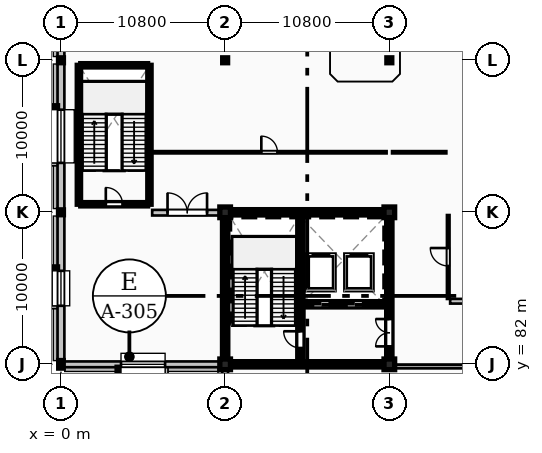
"""IFC4 building model, lengths in metres.
Left out: names, types, materials, properties, quantities, classifications, styles, units other than length and angle.
Written with IfcOpenShell. Run it as: python <this file> out.ifc"""

import sys

from ifc_helpers import new_model, si_unit, direction, frame, frame_2d, origin, origin_2d, place, context, subcontext, project, spatial, rectangle, hollow_circle, i_section, extrude, element, fill, save


model = new_model("IFC4")
c1 = context("Model", 3, precision=1e-05, world=origin(), true_north=direction((0.0, 1.0)))
c2 = subcontext(c1, "Body", "Model", "MODEL_VIEW")
j1 = project(units=[si_unit("LENGTHUNIT", "METRE"), si_unit("PLANEANGLEUNIT", "RADIAN")], contexts=[c1])
p1 = place(None, origin())
s1 = spatial("IfcSite", under=j1, at=p1, CompositionType="ELEMENT")
p2 = place(p1, origin())
s2 = spatial("IfcBuilding", under=s1, at=p2, CompositionType="ELEMENT")
p3 = place(p2, frame((0.0, 0.0, 4.8)))
s3 = spatial("IfcBuildingStorey", under=s2, at=p3, CompositionType="ELEMENT", Elevation=4.8)
p4 = place(p3, frame((0.0, 82.0, 0.0), z_axis=(0.0, 0.0, 1.0), x_axis=(1.0, 0.0, 0.0)))
e1 = element("IfcColumn", 1, at=p4, inside=s3, PredefinedType="COLUMN", context=c2, shape_type="SweptSolid", body=[
    extrude(i_section(OverallWidth=0.3, OverallDepth=0.5, WebThickness=0.014, FlangeThickness=0.028, FilletRadius=0.027, at=origin_2d()), origin(), (0.0, 0.0, 1.0), 4.8),
])
for number, where, z_axis, x_axis in (
    (2, (0.0, 92.0, 0.0), (0.0, 0.0, 1.0), (1.0, 0.0, 0.0)),
    (3, (0.0, 102.0, 0.0), (0.0, 0.0, 1.0), (1.0, 0.0, 0.0)),
):
    element("IfcColumn", number, at=place(p3, frame(where, z_axis=z_axis, x_axis=x_axis)), inside=s3, PredefinedType="COLUMN", context=c2, shape_type="SweptSolid", body=[
        extrude(hollow_circle(Radius=0.162, WallThickness=0.014, at=origin_2d()), origin(), (0.0, 0.0, 1.0), 4.8),
    ])
for number, where, z_axis, x_axis in (
    (4, (10.8, 82.0, 0.0), (0.0, 0.0, 1.0), (1.0, 0.0, 0.0)),
    (5, (10.8, 92.0, 0.0), (0.0, 0.0, 1.0), (1.0, 0.0, 0.0)),
):
    element("IfcColumn", number, at=place(p3, frame(where, z_axis=z_axis, x_axis=x_axis)), inside=s3, PredefinedType="COLUMN", context=c2, shape_type="SweptSolid", body=[
        extrude(rectangle(XDim=0.7, YDim=0.7, at=origin_2d()), origin(), (0.0, 0.0, 1.0), 4.8),
    ])
p5 = place(p3, frame((10.8, 102.0, 0.0), z_axis=(0.0, 0.0, 1.0), x_axis=(1.0, 0.0, 0.0)))
e6 = element("IfcColumn", 6, at=p5, inside=s3, PredefinedType="COLUMN", context=c2, shape_type="SweptSolid", body=[
    extrude(hollow_circle(Radius=0.162, WallThickness=0.014, at=origin_2d()), origin(), (0.0, 0.0, 1.0), 4.8),
])
for number, where, z_axis, x_axis in (
    (7, (21.6, 82.0, 0.0), (0.0, 0.0, 1.0), (1.0, 0.0, 0.0)),
    (8, (21.6, 92.0, 0.0), (0.0, 0.0, 1.0), (1.0, 0.0, 0.0)),
):
    element("IfcColumn", number, at=place(p3, frame(where, z_axis=z_axis, x_axis=x_axis)), inside=s3, PredefinedType="COLUMN", context=c2, shape_type="SweptSolid", body=[
        extrude(rectangle(XDim=0.7, YDim=0.7, at=origin_2d()), origin(), (0.0, 0.0, 1.0), 4.8),
    ])
p6 = place(p3, frame((21.6, 102.0, 0.0), z_axis=(0.0, 0.0, 1.0), x_axis=(1.0, 0.0, 0.0)))
e9 = element("IfcColumn", 9, at=p6, inside=s3, PredefinedType="COLUMN", context=c2, shape_type="SweptSolid", body=[
    extrude(hollow_circle(Radius=0.162, WallThickness=0.014, at=origin_2d()), origin(), (0.0, 0.0, 1.0), 4.8),
])
p7 = place(p3, frame((0.0, 111.855, 0.0), z_axis=(0.0, 0.0, 1.0), x_axis=(0.0, -1.0, 0.0)))
e10 = element("IfcWall", 10, at=p7, inside=s3, PredefinedType="STANDARD", context=c2, shape_type="SweptSolid", body=[
    extrude(rectangle(XDim=9.71, YDim=0.45, at=frame_2d((4.855, 0.0))), origin(), (0.0, 0.0, 1.0), 4.56),
])
p8 = place(p7, frame((4.08, 0.0, 1.0)))
e11 = element("IfcOpeningElement", 11, at=p8, cuts=e10, PredefinedType="OPENING", context=c2, shape_type="SweptSolid", body=[
    extrude(rectangle(XDim=1.55, YDim=2.5, at=frame_2d((0.775, 1.25))), frame((0.0, 0.235, 0.0), z_axis=(0.0, -1.0, 0.0), x_axis=(1.0, 0.0, 0.0)), (0.0, 0.0, 1.0), 0.47),
])
p9 = place(p3, frame((0.0, 101.855, 0.0), z_axis=(0.0, 0.0, 1.0), x_axis=(0.0, -1.0, 0.0)))
e12 = element("IfcWall", 12, at=p9, inside=s3, PredefinedType="STANDARD", context=c2, shape_type="SweptSolid", body=[
    extrude(rectangle(XDim=9.71, YDim=0.45, at=frame_2d((4.855, 0.0))), origin(), (0.0, 0.0, 1.0), 4.56),
])
p10 = place(p9, frame((3.105, 0.0, 1.0)))
e13 = element("IfcOpeningElement", 13, at=p10, cuts=e12, PredefinedType="OPENING", context=c2, shape_type="SweptSolid", body=[
    extrude(rectangle(XDim=3.5, YDim=2.3, at=frame_2d((1.75, 1.15))), frame((0.0, 0.235, 0.0), z_axis=(0.0, -1.0, 0.0), x_axis=(1.0, 0.0, 0.0)), (0.0, 0.0, 1.0), 0.47),
])
p11 = place(p3, frame((0.0, 91.855, 0.0), z_axis=(0.0, 0.0, 1.0), x_axis=(0.0, -1.0, 0.0)))
e14 = element("IfcWall", 14, at=p11, inside=s3, PredefinedType="STANDARD", context=c2, shape_type="SweptSolid", body=[
    extrude(rectangle(XDim=9.71, YDim=0.45, at=frame_2d((4.855, 0.0))), origin(), (0.0, 0.0, 1.0), 4.56),
])
p12 = place(p11, frame((3.705, 0.0, 1.0)))
e15 = element("IfcOpeningElement", 15, at=p12, cuts=e14, PredefinedType="OPENING", context=c2, shape_type="SweptSolid", body=[
    extrude(rectangle(XDim=2.3, YDim=2.3, at=frame_2d((1.15, 1.15))), frame((0.0, 0.235, 0.0), z_axis=(0.0, -1.0, 0.0), x_axis=(1.0, 0.0, 0.0)), (0.0, 0.0, 1.0), 0.47),
])
p13 = place(p3, frame((0.145, 82.0, 0.0), z_axis=(0.0, 0.0, 1.0), x_axis=(1.0, 0.0, 0.0)))
e16 = element("IfcWall", 16, at=p13, inside=s3, PredefinedType="STANDARD", context=c2, shape_type="SweptSolid", body=[
    extrude(rectangle(XDim=10.51, YDim=0.38, at=frame_2d((5.255, 0.0))), origin(), (0.0, 0.0, 1.0), 3.939),
])
p14 = place(p13, frame((3.805, 0.0, 1.0)))
e17 = element("IfcOpeningElement", 17, at=p14, cuts=e16, PredefinedType="OPENING", context=c2, shape_type="SweptSolid", body=[
    extrude(rectangle(XDim=2.9, YDim=2.5, at=frame_2d((1.45, 1.25))), frame((0.0, 0.2, 0.0), z_axis=(0.0, -1.0, 0.0), x_axis=(1.0, 0.0, 0.0)), (0.0, 0.0, 1.0), 0.4),
])
p15 = place(p3, frame((10.8, 81.855, 0.0), z_axis=(0.0, 0.0, 1.0), x_axis=(0.0, -1.0, 0.0)))
e18 = element("IfcWall", 18, at=p15, inside=s3, PredefinedType="STANDARD", context=c2, shape_type="SweptSolid", body=[
    extrude(rectangle(XDim=9.71, YDim=0.38, at=frame_2d((4.855, 0.0))), origin(), (0.0, 0.0, 1.0), 4.04),
])
p16 = place(p15, frame((3.105, 0.0, 1.0)))
e19 = element("IfcOpeningElement", 19, at=p16, cuts=e18, PredefinedType="OPENING", context=c2, shape_type="SweptSolid", body=[
    extrude(rectangle(XDim=3.5, YDim=2.3, at=frame_2d((1.75, 1.15))), frame((0.0, 0.2, 0.0), z_axis=(0.0, -1.0, 0.0), x_axis=(1.0, 0.0, 0.0)), (0.0, 0.0, 1.0), 0.4),
])
for number, where, z_axis, x_axis in (
    (20, (11.15, 82.0, 0.0), (0.0, 0.0, 1.0), (1.0, 0.0, 0.0)),
    (21, (11.15, 92.0, 0.0), (0.0, 0.0, 1.0), (1.0, 0.0, 0.0)),
):
    element("IfcWall", number, at=place(p3, frame(where, z_axis=z_axis, x_axis=x_axis)), inside=s3, PredefinedType="SHEAR", context=c2, shape_type="SweptSolid", body=[
        extrude(rectangle(XDim=10.1, YDim=0.35, at=frame_2d((5.05, 0.0))), origin(), (0.0, 0.0, 1.0), 4.56),
    ])
p17 = place(p3, frame((10.8, 82.35, 0.0), z_axis=(0.0, 0.0, 1.0), x_axis=(0.0, 1.0, 0.0)))
e22 = element("IfcWall", 22, at=p17, inside=s3, PredefinedType="SHEAR", context=c2, shape_type="SweptSolid", body=[
    extrude(rectangle(XDim=9.3, YDim=0.35, at=frame_2d((4.65, 0.0))), origin(), (0.0, 0.0, 1.0), 4.56),
])
p18 = place(p3, frame((21.6, 82.35, 0.0), z_axis=(0.0, 0.0, 1.0), x_axis=(0.0, 1.0, 0.0)))
e23 = element("IfcWall", 23, at=p18, inside=s3, PredefinedType="SHEAR", context=c2, shape_type="SweptSolid", body=[
    extrude(rectangle(XDim=9.3, YDim=0.35, at=frame_2d((4.65, 0.0))), origin(), (0.0, 0.0, 1.0), 4.56),
])
p19 = place(p18, frame((0.83, 0.0, 0.0)))
e24 = element("IfcOpeningElement", 24, at=p19, cuts=e23, PredefinedType="OPENING", context=c2, shape_type="SweptSolid", body=[
    extrude(rectangle(XDim=1.8, YDim=2.25, at=frame_2d((0.9, 1.125))), frame((0.0, 0.185, 0.0), z_axis=(0.0, -1.0, 0.0), x_axis=(1.0, 0.0, 0.0)), (0.0, 0.0, 1.0), 0.37),
])
p20 = place(p3, frame((15.75, 82.175, 0.0), z_axis=(0.0, 0.0, 1.0), x_axis=(0.0, 1.0, 0.0)))
e25 = element("IfcWall", 25, at=p20, inside=s3, PredefinedType="SHEAR", context=c2, shape_type="SweptSolid", body=[
    extrude(rectangle(XDim=9.65, YDim=0.35, at=frame_2d((4.825, 0.0))), origin(), (0.0, 0.0, 1.0), 4.56),
])
p21 = place(p20, frame((0.9, 0.0, 0.0)))
e26 = element("IfcOpeningElement", 26, at=p21, cuts=e25, PredefinedType="OPENING", context=c2, shape_type="SweptSolid", body=[
    extrude(rectangle(XDim=1.1, YDim=2.2, at=frame_2d((0.55, 1.1))), frame((0.0, 0.185, 0.0), z_axis=(0.0, -1.0, 0.0), x_axis=(1.0, 0.0, 0.0)), (0.0, 0.0, 1.0), 0.37),
])
p22 = place(p3, frame((15.93, 85.95, 0.0), z_axis=(0.0, 0.0, 1.0), x_axis=(1.0, 0.0, 0.0)))
e27 = element("IfcWall", 27, at=p22, inside=s3, PredefinedType="SHEAR", context=c2, shape_type="SweptSolid", body=[
    extrude(rectangle(XDim=5.49, YDim=0.35, at=frame_2d((2.745, 0.0))), origin(), (0.0, 0.0, 1.0), 4.56),
])
p23 = place(p22, frame((0.65, 0.0, 0.0)))
e28 = element("IfcOpeningElement", 28, at=p23, cuts=e27, PredefinedType="OPENING", context=c2, shape_type="SweptSolid", body=[
    extrude(rectangle(XDim=1.1, YDim=2.2, at=frame_2d((0.55, 1.1))), frame((0.0, 0.185, 0.0), z_axis=(0.0, -1.0, 0.0), x_axis=(1.0, 0.0, 0.0)), (0.0, 0.0, 1.0), 0.37),
])
p24 = place(p22, frame((2.85, 0.0, 0.0)))
e29 = element("IfcOpeningElement", 29, at=p24, cuts=e27, PredefinedType="OPENING", context=c2, shape_type="SweptSolid", body=[
    extrude(rectangle(XDim=1.1, YDim=2.2, at=frame_2d((0.55, 1.1))), frame((0.0, 0.185, 0.0), z_axis=(0.0, -1.0, 0.0), x_axis=(1.0, 0.0, 0.0)), (0.0, 0.0, 1.0), 0.37),
])
for number, where, z_axis, x_axis in (
    (30, (1.18, 92.53, 0.0), (0.0, 0.0, 1.0), (0.0, 1.0, 0.0)),
    (31, (5.82, 92.53, 0.0), (0.0, 0.0, 1.0), (0.0, 1.0, 0.0)),
):
    element("IfcWall", number, at=place(p3, frame(where, z_axis=z_axis, x_axis=x_axis)), inside=s3, PredefinedType="SHEAR", context=c2, shape_type="SweptSolid", body=[
        extrude(rectangle(XDim=9.14, YDim=0.22, at=frame_2d((4.57, 0.0))), origin(), (0.0, 0.0, 1.0), 4.56),
    ])
p25 = place(p3, frame((1.3, 101.67, 0.0), z_axis=(0.0, 0.0, 1.0), x_axis=(1.0, 0.0, 0.0)))
e32 = element("IfcWall", 32, at=p25, inside=s3, PredefinedType="SHEAR", context=c2, shape_type="SweptSolid", body=[
    extrude(rectangle(XDim=4.4, YDim=0.22, at=frame_2d((2.2, 0.0))), origin(), (0.0, 0.0, 1.0), 4.56),
])
p26 = place(p3, frame((1.3, 92.53, 0.0), z_axis=(0.0, 0.0, 1.0), x_axis=(1.0, 0.0, 0.0)))
e33 = element("IfcWall", 33, at=p26, inside=s3, PredefinedType="SHEAR", context=c2, shape_type="SweptSolid", body=[
    extrude(rectangle(XDim=4.4, YDim=0.22, at=frame_2d((2.2, 0.0))), origin(), (0.0, 0.0, 1.0), 4.56),
])
p27 = place(p26, frame((1.65, 0.0, 0.0)))
e34 = element("IfcOpeningElement", 34, at=p27, cuts=e33, PredefinedType="OPENING", context=c2, shape_type="SweptSolid", body=[
    extrude(rectangle(XDim=1.1, YDim=2.2, at=frame_2d((0.55, 1.1))), frame((0.0, 0.12, 0.0), z_axis=(0.0, -1.0, 0.0), x_axis=(1.0, 0.0, 0.0)), (0.0, 0.0, 1.0), 0.24),
])
p28 = place(p3, frame((21.78, 81.85, 0.0), z_axis=(0.0, 0.0, 1.0), x_axis=(1.0, 0.0, 0.0)))
e35 = element("IfcWall", 35, at=p28, inside=s3, PredefinedType="PARTITIONING", context=c2, shape_type="SweptSolid", body=[
    extrude(rectangle(XDim=10.42, YDim=0.23, at=frame_2d((5.21, 0.0))), origin(), (0.0, 0.0, 1.0), 3.939),
])
p29 = place(p3, frame((25.6, 86.15, 0.0), z_axis=(0.0, 0.0, 1.0), x_axis=(1.0, 0.0, 0.0)))
e36 = element("IfcWall", 36, at=p29, inside=s3, PredefinedType="PARTITIONING", context=c2, shape_type="SweptSolid", body=[
    extrude(rectangle(XDim=28.22, YDim=0.31, at=frame_2d((14.11, 0.0))), origin(), (0.0, 0.0, 1.0), 4.52),
])
p30 = place(p29, frame((12.96, 0.0, 0.0)))
e37 = element("IfcOpeningElement", 37, at=p30, cuts=e36, PredefinedType="OPENING", context=c2, shape_type="SweptSolid", body=[
    extrude(rectangle(XDim=2.3, YDim=2.65, at=frame_2d((1.15, 1.325))), frame((0.0, 0.165, 0.0), z_axis=(0.0, -1.0, 0.0), x_axis=(1.0, 0.0, 0.0)), (0.0, 0.0, 1.0), 0.33),
])
p31 = place(p3, frame((6.0, 91.975, 0.0), z_axis=(0.0, 0.0, 1.0), x_axis=(1.0, 0.0, 0.0)))
e38 = element("IfcWall", 38, at=p31, inside=s3, PredefinedType="PARTITIONING", context=c2, shape_type="SweptSolid", body=[
    extrude(rectangle(XDim=4.62, YDim=0.37, at=frame_2d((2.31, 0.0))), origin(), (0.0, 0.0, 1.0), 4.069),
])
p32 = place(p31, frame((1.01, 0.0, 0.0)))
e39 = element("IfcOpeningElement", 39, at=p32, cuts=e38, PredefinedType="OPENING", context=c2, shape_type="SweptSolid", body=[
    extrude(rectangle(XDim=2.6, YDim=2.8, at=frame_2d((1.3, 1.4))), frame((0.0, 0.195, 0.0), z_axis=(0.0, -1.0, 0.0), x_axis=(1.0, 0.0, 0.0)), (0.0, 0.0, 1.0), 0.39),
])
p33 = place(p3, frame((6.0, 95.95, 0.0), z_axis=(0.0, 0.0, 1.0), x_axis=(1.0, 0.0, 0.0)))
e40 = element("IfcWall", 40, at=p33, inside=s3, PredefinedType="PARTITIONING", context=c2, shape_type="SweptSolid", body=[
    extrude(rectangle(XDim=15.42, YDim=0.15, at=frame_2d((7.71, 0.0))), origin(), (0.0, 0.0, 1.0), 4.52),
])
p34 = place(p33, frame((7.18, 0.0, 0.0)))
e41 = element("IfcOpeningElement", 41, at=p34, cuts=e40, PredefinedType="OPENING", context=c2, shape_type="SweptSolid", body=[
    extrude(rectangle(XDim=1.06, YDim=2.22, at=frame_2d((0.53, 1.11))), frame((0.0, 0.085, 0.0), z_axis=(0.0, -1.0, 0.0), x_axis=(1.0, 0.0, 0.0)), (0.0, 0.0, 1.0), 0.17),
])
p35 = place(p3, frame((25.475, 86.3, 0.0), z_axis=(0.0, 0.0, 1.0), x_axis=(0.0, 1.0, 0.0)))
e42 = element("IfcWall", 42, at=p35, inside=s3, PredefinedType="PARTITIONING", context=c2, shape_type="SweptSolid", body=[
    extrude(rectangle(XDim=5.52, YDim=0.17, at=frame_2d((2.76, 0.0))), origin(), (0.0, 0.0, 1.0), 4.52),
])
p36 = place(p35, frame((2.17, 0.0, 0.0)))
e43 = element("IfcOpeningElement", 43, at=p36, cuts=e42, PredefinedType="OPENING", context=c2, shape_type="SweptSolid", body=[
    extrude(rectangle(XDim=1.18, YDim=2.28, at=frame_2d((0.59, 1.14))), frame((0.0, 0.095, 0.0), z_axis=(0.0, -1.0, 0.0), x_axis=(1.0, 0.0, 0.0)), (0.0, 0.0, 1.0), 0.19),
])
p37 = place(p3, frame((21.78, 95.95, 0.0), z_axis=(0.0, 0.0, 1.0), x_axis=(1.0, 0.0, 0.0)))
e44 = element("IfcWall", 44, at=p37, inside=s3, PredefinedType="PARTITIONING", context=c2, shape_type="SweptSolid", body=[
    extrude(rectangle(XDim=3.57, YDim=0.15, at=frame_2d((1.785, 0.0))), origin(), (0.0, 0.0, 1.0), 4.52),
])
p38 = place(p10, origin())
e45 = element("IfcWindow", 45, at=p38, inside=s3, PartitioningType="SINGLE_PANEL", PredefinedType="WINDOW", context=c2, shape_type="SweptSolid", body=[
    extrude(rectangle(XDim=3.5, YDim=2.3, at=frame_2d((1.75, 1.15))), frame((0.0, 0.03, 0.0), z_axis=(0.0, -1.0, 0.0), x_axis=(1.0, 0.0, 0.0)), (0.0, 0.0, 1.0), 0.06),
])
fill(e13, e45)
p39 = place(p12, origin())
e46 = element("IfcWindow", 46, at=p39, inside=s3, PartitioningType="SINGLE_PANEL", PredefinedType="WINDOW", context=c2, shape_type="SweptSolid", body=[
    extrude(rectangle(XDim=2.3, YDim=2.3, at=frame_2d((1.15, 1.15))), frame((0.0, 0.03, 0.0), z_axis=(0.0, -1.0, 0.0), x_axis=(1.0, 0.0, 0.0)), (0.0, 0.0, 1.0), 0.06),
])
fill(e15, e46)
p40 = place(p14, origin())
e47 = element("IfcWindow", 47, at=p40, inside=s3, PartitioningType="SINGLE_PANEL", PredefinedType="WINDOW", context=c2, shape_type="SweptSolid", body=[
    extrude(rectangle(XDim=2.9, YDim=2.5, at=frame_2d((1.45, 1.25))), frame((0.0, 0.03, 0.0), z_axis=(0.0, -1.0, 0.0), x_axis=(1.0, 0.0, 0.0)), (0.0, 0.0, 1.0), 0.06),
])
fill(e17, e47)
p41 = place(p21, origin())
e48 = element("IfcDoor", 48, at=p41, inside=s3, OperationType="SINGLE_SWING_RIGHT", PredefinedType="DOOR", context=c2, shape_type="SweptSolid", body=[
    extrude(rectangle(XDim=1.1, YDim=2.2, at=frame_2d((0.55, 1.1))), frame((0.0, 0.025, 0.0), z_axis=(0.0, -1.0, 0.0), x_axis=(1.0, 0.0, 0.0)), (0.0, 0.0, 1.0), 0.05),
])
fill(e26, e48)
p42 = place(p19, origin())
e49 = element("IfcDoor", 49, at=p42, inside=s3, OperationType="DOUBLE_DOOR_SINGLE_SWING", PredefinedType="DOOR", context=c2, shape_type="SweptSolid", body=[
    extrude(rectangle(XDim=1.8, YDim=2.25, at=frame_2d((0.9, 1.125))), frame((0.0, 0.025, 0.0), z_axis=(0.0, -1.0, 0.0), x_axis=(1.0, 0.0, 0.0)), (0.0, 0.0, 1.0), 0.05),
])
fill(e24, e49)
p43 = place(p23, origin())
e50 = element("IfcDoor", 50, at=p43, inside=s3, OperationType="DOUBLE_DOOR_SLIDING", PredefinedType="DOOR", context=c2, shape_type="SweptSolid", body=[
    extrude(rectangle(XDim=1.1, YDim=2.2, at=frame_2d((0.55, 1.1))), frame((0.0, 0.025, 0.0), z_axis=(0.0, -1.0, 0.0), x_axis=(1.0, 0.0, 0.0)), (0.0, 0.0, 1.0), 0.05),
])
fill(e28, e50)
p44 = place(p24, origin())
e51 = element("IfcDoor", 51, at=p44, inside=s3, OperationType="DOUBLE_DOOR_SLIDING", PredefinedType="DOOR", context=c2, shape_type="SweptSolid", body=[
    extrude(rectangle(XDim=1.1, YDim=2.2, at=frame_2d((0.55, 1.1))), frame((0.0, 0.025, 0.0), z_axis=(0.0, -1.0, 0.0), x_axis=(1.0, 0.0, 0.0)), (0.0, 0.0, 1.0), 0.05),
])
fill(e29, e51)
p45 = place(p27, origin())
e52 = element("IfcDoor", 52, at=p45, inside=s3, OperationType="SINGLE_SWING_LEFT", PredefinedType="DOOR", context=c2, shape_type="SweptSolid", body=[
    extrude(rectangle(XDim=1.1, YDim=2.2, at=frame_2d((0.55, 1.1))), frame((0.0, 0.025, 0.0), z_axis=(0.0, -1.0, 0.0), x_axis=(1.0, 0.0, 0.0)), (0.0, 0.0, 1.0), 0.05),
])
fill(e34, e52)
p46 = place(p32, origin())
e53 = element("IfcDoor", 53, at=p46, inside=s3, OperationType="DOUBLE_DOOR_SINGLE_SWING", PredefinedType="DOOR", context=c2, shape_type="SweptSolid", body=[
    extrude(rectangle(XDim=2.6, YDim=2.8, at=frame_2d((1.3, 1.4))), frame((0.0, 0.025, 0.0), z_axis=(0.0, -1.0, 0.0), x_axis=(1.0, 0.0, 0.0)), (0.0, 0.0, 1.0), 0.05),
])
fill(e39, e53)
p47 = place(p34, origin())
e54 = element("IfcDoor", 54, at=p47, inside=s3, OperationType="SINGLE_SWING_LEFT", PredefinedType="DOOR", context=c2, shape_type="SweptSolid", body=[
    extrude(rectangle(XDim=1.06, YDim=2.22, at=frame_2d((0.53, 1.11))), frame((0.0, 0.025, 0.0), z_axis=(0.0, -1.0, 0.0), x_axis=(1.0, 0.0, 0.0)), (0.0, 0.0, 1.0), 0.05),
])
fill(e41, e54)
p48 = place(p36, origin())
e55 = element("IfcDoor", 55, at=p48, inside=s3, OperationType="SINGLE_SWING_RIGHT", PredefinedType="DOOR", context=c2, shape_type="SweptSolid", body=[
    extrude(rectangle(XDim=1.18, YDim=2.28, at=frame_2d((0.59, 1.14))), frame((0.0, 0.025, 0.0), z_axis=(0.0, -1.0, 0.0), x_axis=(1.0, 0.0, 0.0)), (0.0, 0.0, 1.0), 0.05),
])
fill(e43, e55)
save(model, sys.argv[1])
